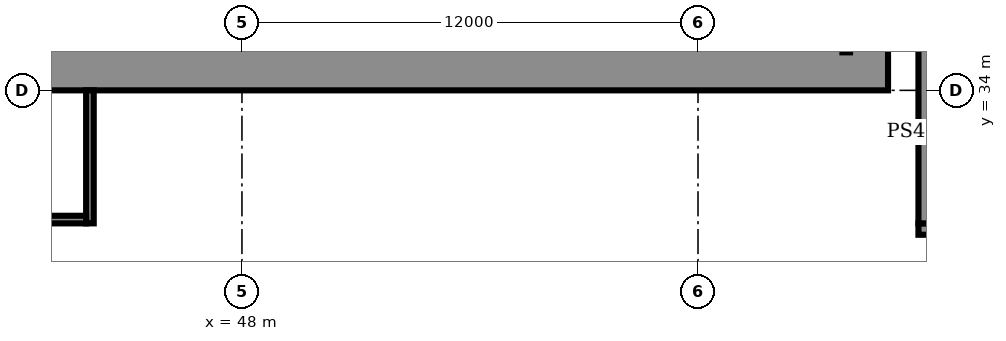
"""IFC4 building model, lengths in metres.
Left out: names, types, materials, properties, quantities, classifications, styles, units other than length and angle.
Written with IfcOpenShell. Run it as: python <this file> out.ifc"""

import sys

from ifc_helpers import new_model, si_unit, direction, frame, frame_2d, origin, origin_2d, place, context, subcontext, project, spatial, rectangle, extrude, element, fill, save


model = new_model("IFC4")
c1 = context("Model", 3, precision=1e-05, world=origin(), true_north=direction((0.0, 1.0)))
c2 = subcontext(c1, "Body", "Model", "MODEL_VIEW")
j1 = project(units=[si_unit("LENGTHUNIT", "METRE"), si_unit("PLANEANGLEUNIT", "RADIAN")], contexts=[c1])
p1 = place(None, origin())
s1 = spatial("IfcSite", under=j1, at=p1, CompositionType="ELEMENT")
p2 = place(p1, origin())
s2 = spatial("IfcBuilding", under=s1, at=p2, CompositionType="ELEMENT")
p3 = place(p2, origin())
s3 = spatial("IfcBuildingStorey", under=s2, at=p3, CompositionType="ELEMENT", Elevation=0.0)
for number, where, z_axis, x_axis in (
    (1, (53.0, 32.0, 0.0), (0.0, 0.0, 1.0), (1.0, 0.0, 0.0)),
    (2, (64.0, 32.0, 0.0), (0.0, 0.0, 1.0), (1.0, 0.0, 0.0)),
):
    element("IfcColumn", number, at=place(p3, frame(where, z_axis=z_axis, x_axis=x_axis)), inside=s3, PredefinedType="COLUMN", context=c2, shape_type="SweptSolid", body=[
        extrude(rectangle(XDim=1.0, YDim=1.0, at=origin_2d()), origin(), (0.0, 0.0, 1.0), 8.0),
    ])
p4 = place(p3, frame((9.0, 34.6, 0.0), z_axis=(0.0, 0.0, 1.0), x_axis=(1.0, 0.0, 0.0)))
e3 = element("IfcWall", 3, at=p4, inside=s3, PredefinedType="SHEAR", context=c2, shape_type="SweptSolid", body=[
    extrude(rectangle(XDim=56.0, YDim=1.2, at=frame_2d((28.0, 0.0))), origin(), (0.0, 0.0, 1.0), 7.7),
])
p5 = place(p4, frame((3.3, 0.0, 0.0)))
e4 = element("IfcOpeningElement", 4, at=p5, cuts=e3, PredefinedType="OPENING", context=c2, shape_type="SweptSolid", body=[
    extrude(rectangle(XDim=1.0, YDim=2.1, at=frame_2d((0.5, 1.05))), frame((0.0, 0.61, 0.0), z_axis=(0.0, -1.0, 0.0), x_axis=(1.0, 0.0, 0.0)), (0.0, 0.0, 1.0), 1.22),
])
p6 = place(p4, frame((7.867, 0.0, 0.0)))
e5 = element("IfcOpeningElement", 5, at=p6, cuts=e3, PredefinedType="OPENING", context=c2, shape_type="SweptSolid", body=[
    extrude(rectangle(XDim=1.1, YDim=2.1, at=frame_2d((0.55, 1.05))), frame((0.0, 0.61, 0.0), z_axis=(0.0, -1.0, 0.0), x_axis=(1.0, 0.0, 0.0)), (0.0, 0.0, 1.0), 1.22),
])
p7 = place(p4, frame((12.033, 0.0, 0.0)))
e6 = element("IfcOpeningElement", 6, at=p7, cuts=e3, PredefinedType="OPENING", context=c2, shape_type="SweptSolid", body=[
    extrude(rectangle(XDim=1.1, YDim=2.1, at=frame_2d((0.55, 1.05))), frame((0.0, 0.61, 0.0), z_axis=(0.0, -1.0, 0.0), x_axis=(1.0, 0.0, 0.0)), (0.0, 0.0, 1.0), 1.22),
])
p8 = place(p4, frame((9.8, 0.0, 0.0)))
e7 = element("IfcOpeningElement", 7, at=p8, cuts=e3, PredefinedType="OPENING", context=c2, shape_type="SweptSolid", body=[
    extrude(rectangle(XDim=1.4, YDim=2.1, at=frame_2d((0.7, 1.05))), frame((0.0, 0.61, 0.0), z_axis=(0.0, -1.0, 0.0), x_axis=(1.0, 0.0, 0.0)), (0.0, 0.0, 1.0), 1.22),
])
p9 = place(p4, frame((14.65, 0.0, 0.0)))
e8 = element("IfcOpeningElement", 8, at=p9, cuts=e3, PredefinedType="OPENING", context=c2, shape_type="SweptSolid", body=[
    extrude(rectangle(XDim=1.2, YDim=2.1, at=frame_2d((0.6, 1.05))), frame((0.0, 0.61, 0.0), z_axis=(0.0, -1.0, 0.0), x_axis=(1.0, 0.0, 0.0)), (0.0, 0.0, 1.0), 1.22),
])
p10 = place(p4, frame((21.867, 0.0, 0.0)))
e9 = element("IfcOpeningElement", 9, at=p10, cuts=e3, PredefinedType="OPENING", context=c2, shape_type="SweptSolid", body=[
    extrude(rectangle(XDim=1.1, YDim=2.1, at=frame_2d((0.55, 1.05))), frame((0.0, 0.61, 0.0), z_axis=(0.0, -1.0, 0.0), x_axis=(1.0, 0.0, 0.0)), (0.0, 0.0, 1.0), 1.22),
])
p11 = place(p4, frame((26.033, 0.0, 0.0)))
e10 = element("IfcOpeningElement", 10, at=p11, cuts=e3, PredefinedType="OPENING", context=c2, shape_type="SweptSolid", body=[
    extrude(rectangle(XDim=1.1, YDim=2.1, at=frame_2d((0.55, 1.05))), frame((0.0, 0.61, 0.0), z_axis=(0.0, -1.0, 0.0), x_axis=(1.0, 0.0, 0.0)), (0.0, 0.0, 1.0), 1.22),
])
p12 = place(p4, frame((23.8, 0.0, 0.0)))
e11 = element("IfcOpeningElement", 11, at=p12, cuts=e3, PredefinedType="OPENING", context=c2, shape_type="SweptSolid", body=[
    extrude(rectangle(XDim=1.4, YDim=2.1, at=frame_2d((0.7, 1.05))), frame((0.0, 0.61, 0.0), z_axis=(0.0, -1.0, 0.0), x_axis=(1.0, 0.0, 0.0)), (0.0, 0.0, 1.0), 1.22),
])
p13 = place(p4, frame((28.867, 0.0, 0.0)))
e12 = element("IfcOpeningElement", 12, at=p13, cuts=e3, PredefinedType="OPENING", context=c2, shape_type="SweptSolid", body=[
    extrude(rectangle(XDim=1.1, YDim=2.1, at=frame_2d((0.55, 1.05))), frame((0.0, 0.61, 0.0), z_axis=(0.0, -1.0, 0.0), x_axis=(1.0, 0.0, 0.0)), (0.0, 0.0, 1.0), 1.22),
])
p14 = place(p4, frame((33.033, 0.0, 0.0)))
e13 = element("IfcOpeningElement", 13, at=p14, cuts=e3, PredefinedType="OPENING", context=c2, shape_type="SweptSolid", body=[
    extrude(rectangle(XDim=1.1, YDim=2.1, at=frame_2d((0.55, 1.05))), frame((0.0, 0.61, 0.0), z_axis=(0.0, -1.0, 0.0), x_axis=(1.0, 0.0, 0.0)), (0.0, 0.0, 1.0), 1.22),
])
p15 = place(p4, frame((40.15, 0.0, 0.0)))
e14 = element("IfcOpeningElement", 14, at=p15, cuts=e3, PredefinedType="OPENING", context=c2, shape_type="SweptSolid", body=[
    extrude(rectangle(XDim=1.2, YDim=2.1, at=frame_2d((0.6, 1.05))), frame((0.0, 0.61, 0.0), z_axis=(0.0, -1.0, 0.0), x_axis=(1.0, 0.0, 0.0)), (0.0, 0.0, 1.0), 1.22),
])
p16 = place(p4, frame((42.867, 0.0, 0.0)))
e15 = element("IfcOpeningElement", 15, at=p16, cuts=e3, PredefinedType="OPENING", context=c2, shape_type="SweptSolid", body=[
    extrude(rectangle(XDim=1.1, YDim=2.1, at=frame_2d((0.55, 1.05))), frame((0.0, 0.61, 0.0), z_axis=(0.0, -1.0, 0.0), x_axis=(1.0, 0.0, 0.0)), (0.0, 0.0, 1.0), 1.22),
])
p17 = place(p4, frame((47.033, 0.0, 0.0)))
e16 = element("IfcOpeningElement", 16, at=p17, cuts=e3, PredefinedType="OPENING", context=c2, shape_type="SweptSolid", body=[
    extrude(rectangle(XDim=1.1, YDim=2.1, at=frame_2d((0.55, 1.05))), frame((0.0, 0.61, 0.0), z_axis=(0.0, -1.0, 0.0), x_axis=(1.0, 0.0, 0.0)), (0.0, 0.0, 1.0), 1.22),
])
p18 = place(p4, frame((44.8, 0.0, 0.0)))
e17 = element("IfcOpeningElement", 17, at=p18, cuts=e3, PredefinedType="OPENING", context=c2, shape_type="SweptSolid", body=[
    extrude(rectangle(XDim=1.4, YDim=2.1, at=frame_2d((0.7, 1.05))), frame((0.0, 0.61, 0.0), z_axis=(0.0, -1.0, 0.0), x_axis=(1.0, 0.0, 0.0)), (0.0, 0.0, 1.0), 1.22),
])
p19 = place(p4, frame((49.867, 0.0, 0.0)))
e18 = element("IfcOpeningElement", 18, at=p19, cuts=e3, PredefinedType="OPENING", context=c2, shape_type="SweptSolid", body=[
    extrude(rectangle(XDim=1.1, YDim=2.1, at=frame_2d((0.55, 1.05))), frame((0.0, 0.61, 0.0), z_axis=(0.0, -1.0, 0.0), x_axis=(1.0, 0.0, 0.0)), (0.0, 0.0, 1.0), 1.22),
])
p20 = place(p4, frame((53.5, 0.0, 0.0)))
e19 = element("IfcOpeningElement", 19, at=p20, cuts=e3, PredefinedType="OPENING", context=c2, shape_type="SweptSolid", body=[
    extrude(rectangle(XDim=1.1, YDim=2.1, at=frame_2d((0.55, 1.05))), frame((0.0, 0.61, 0.0), z_axis=(0.0, -1.0, 0.0), x_axis=(1.0, 0.0, 0.0)), (0.0, 0.0, 1.0), 1.22),
])
p21 = place(p4, frame((51.567, 0.0, 0.0)))
e20 = element("IfcOpeningElement", 20, at=p21, cuts=e3, PredefinedType="OPENING", context=c2, shape_type="SweptSolid", body=[
    extrude(rectangle(XDim=1.4, YDim=2.1, at=frame_2d((0.7, 1.05))), frame((0.0, 0.61, 0.0), z_axis=(0.0, -1.0, 0.0), x_axis=(1.0, 0.0, 0.0)), (0.0, 0.0, 1.0), 1.22),
])
p22 = place(p3, frame((44.0, 30.5, 0.0), z_axis=(0.0, 0.0, 1.0), x_axis=(0.0, 1.0, 0.0)))
e21 = element("IfcWall", 21, at=p22, inside=s3, PredefinedType="PARTITIONING", context=c2, shape_type="SweptSolid", body=[
    extrude(rectangle(XDim=3.5, YDim=0.2, at=frame_2d((1.75, 0.0))), origin(), (0.0, 0.0, 1.0), 7.7),
])
p23 = place(p22, frame((1.2, 0.0, 0.0)))
e22 = element("IfcOpeningElement", 22, at=p23, cuts=e21, PredefinedType="OPENING", context=c2, shape_type="SweptSolid", body=[
    extrude(rectangle(XDim=1.1, YDim=2.1, at=frame_2d((0.55, 1.05))), frame((0.0, 0.11, 0.0), z_axis=(0.0, -1.0, 0.0), x_axis=(1.0, 0.0, 0.0)), (0.0, 0.0, 1.0), 0.22),
])
p24 = place(p3, frame((41.1, 30.6, 0.0), z_axis=(0.0, 0.0, 1.0), x_axis=(1.0, 0.0, 0.0)))
e23 = element("IfcWall", 23, at=p24, inside=s3, PredefinedType="PARTITIONING", context=c2, shape_type="SweptSolid", body=[
    extrude(rectangle(XDim=2.8, YDim=0.2, at=frame_2d((1.4, 0.0))), origin(), (0.0, 0.0, 1.0), 7.7),
])
p25 = place(p3, frame((65.8, 30.35, 0.0), z_axis=(0.0, 0.0, 1.0), x_axis=(1.0, 0.0, 0.0)))
e24 = element("IfcWall", 24, at=p25, inside=s3, PredefinedType="SHEAR", context=c2, shape_type="SweptSolid", body=[
    extrude(rectangle(XDim=5.55, YDim=0.3, at=frame_2d((2.775, 0.0))), origin(), (0.0, 0.0, 1.0), 7.7),
])
p26 = place(p25, frame((1.575, 0.0, 0.0)))
e25 = element("IfcOpeningElement", 25, at=p26, cuts=e24, PredefinedType="OPENING", context=c2, shape_type="SweptSolid", body=[
    extrude(rectangle(XDim=2.4, YDim=2.1, at=frame_2d((1.2, 1.05))), frame((0.0, 0.16, 0.0), z_axis=(0.0, -1.0, 0.0), x_axis=(1.0, 0.0, 0.0)), (0.0, 0.0, 1.0), 0.32),
])
p27 = place(p3, frame((65.95, 30.5, 0.0), z_axis=(0.0, 0.0, 1.0), x_axis=(0.0, 1.0, 0.0)))
e26 = element("IfcWall", 26, at=p27, inside=s3, PredefinedType="SHEAR", context=c2, shape_type="SweptSolid", body=[
    extrude(rectangle(XDim=8.4, YDim=0.3, at=frame_2d((4.2, 0.0))), origin(), (0.0, 0.0, 1.0), 7.7),
])
p28 = place(p14, origin())
e27 = element("IfcDoor", 27, at=p28, inside=s3, OperationType="DOUBLE_DOOR_SLIDING", PredefinedType="DOOR", context=c2, shape_type="SweptSolid", body=[
    extrude(rectangle(XDim=1.1, YDim=2.1, at=frame_2d((0.55, 1.05))), frame((0.0, 0.025, 0.0), z_axis=(0.0, -1.0, 0.0), x_axis=(1.0, 0.0, 0.0)), (0.0, 0.0, 1.0), 0.05),
])
fill(e13, e27)
p29 = place(p15, origin())
e28 = element("IfcDoor", 28, at=p29, inside=s3, OperationType="SINGLE_SWING_LEFT", PredefinedType="DOOR", context=c2, shape_type="SweptSolid", body=[
    extrude(rectangle(XDim=1.2, YDim=2.1, at=frame_2d((0.6, 1.05))), frame((0.0, 0.025, 0.0), z_axis=(0.0, -1.0, 0.0), x_axis=(1.0, 0.0, 0.0)), (0.0, 0.0, 1.0), 0.05),
])
fill(e14, e28)
p30 = place(p16, origin())
e29 = element("IfcDoor", 29, at=p30, inside=s3, OperationType="DOUBLE_DOOR_SLIDING", PredefinedType="DOOR", context=c2, shape_type="SweptSolid", body=[
    extrude(rectangle(XDim=1.1, YDim=2.1, at=frame_2d((0.55, 1.05))), frame((0.0, 0.025, 0.0), z_axis=(0.0, -1.0, 0.0), x_axis=(1.0, 0.0, 0.0)), (0.0, 0.0, 1.0), 0.05),
])
fill(e15, e29)
p31 = place(p17, origin())
e30 = element("IfcDoor", 30, at=p31, inside=s3, OperationType="DOUBLE_DOOR_SLIDING", PredefinedType="DOOR", context=c2, shape_type="SweptSolid", body=[
    extrude(rectangle(XDim=1.1, YDim=2.1, at=frame_2d((0.55, 1.05))), frame((0.0, 0.025, 0.0), z_axis=(0.0, -1.0, 0.0), x_axis=(1.0, 0.0, 0.0)), (0.0, 0.0, 1.0), 0.05),
])
fill(e16, e30)
p32 = place(p18, origin())
e31 = element("IfcDoor", 31, at=p32, inside=s3, OperationType="DOUBLE_DOOR_SINGLE_SWING", PredefinedType="DOOR", context=c2, shape_type="SweptSolid", body=[
    extrude(rectangle(XDim=1.4, YDim=2.1, at=frame_2d((0.7, 1.05))), frame((0.0, 0.025, 0.0), z_axis=(0.0, -1.0, 0.0), x_axis=(1.0, 0.0, 0.0)), (0.0, 0.0, 1.0), 0.05),
])
fill(e17, e31)
p33 = place(p19, origin())
e32 = element("IfcDoor", 32, at=p33, inside=s3, OperationType="DOUBLE_DOOR_SLIDING", PredefinedType="DOOR", context=c2, shape_type="SweptSolid", body=[
    extrude(rectangle(XDim=1.1, YDim=2.1, at=frame_2d((0.55, 1.05))), frame((0.0, 0.025, 0.0), z_axis=(0.0, -1.0, 0.0), x_axis=(1.0, 0.0, 0.0)), (0.0, 0.0, 1.0), 0.05),
])
fill(e18, e32)
p34 = place(p20, origin())
e33 = element("IfcDoor", 33, at=p34, inside=s3, OperationType="DOUBLE_DOOR_SLIDING", PredefinedType="DOOR", context=c2, shape_type="SweptSolid", body=[
    extrude(rectangle(XDim=1.1, YDim=2.1, at=frame_2d((0.55, 1.05))), frame((0.0, 0.025, 0.0), z_axis=(0.0, -1.0, 0.0), x_axis=(1.0, 0.0, 0.0)), (0.0, 0.0, 1.0), 0.05),
])
fill(e19, e33)
p35 = place(p21, origin())
e34 = element("IfcDoor", 34, at=p35, inside=s3, OperationType="DOUBLE_DOOR_SINGLE_SWING", PredefinedType="DOOR", context=c2, shape_type="SweptSolid", body=[
    extrude(rectangle(XDim=1.4, YDim=2.1, at=frame_2d((0.7, 1.05))), frame((0.0, 0.025, 0.0), z_axis=(0.0, -1.0, 0.0), x_axis=(1.0, 0.0, 0.0)), (0.0, 0.0, 1.0), 0.05),
])
fill(e20, e34)
p36 = place(p23, origin())
e35 = element("IfcDoor", 35, at=p36, inside=s3, OperationType="SINGLE_SWING_LEFT", PredefinedType="DOOR", context=c2, shape_type="SweptSolid", body=[
    extrude(rectangle(XDim=1.1, YDim=2.1, at=frame_2d((0.55, 1.05))), frame((0.0, 0.025, 0.0), z_axis=(0.0, -1.0, 0.0), x_axis=(1.0, 0.0, 0.0)), (0.0, 0.0, 1.0), 0.05),
])
fill(e22, e35)
save(model, sys.argv[1])
